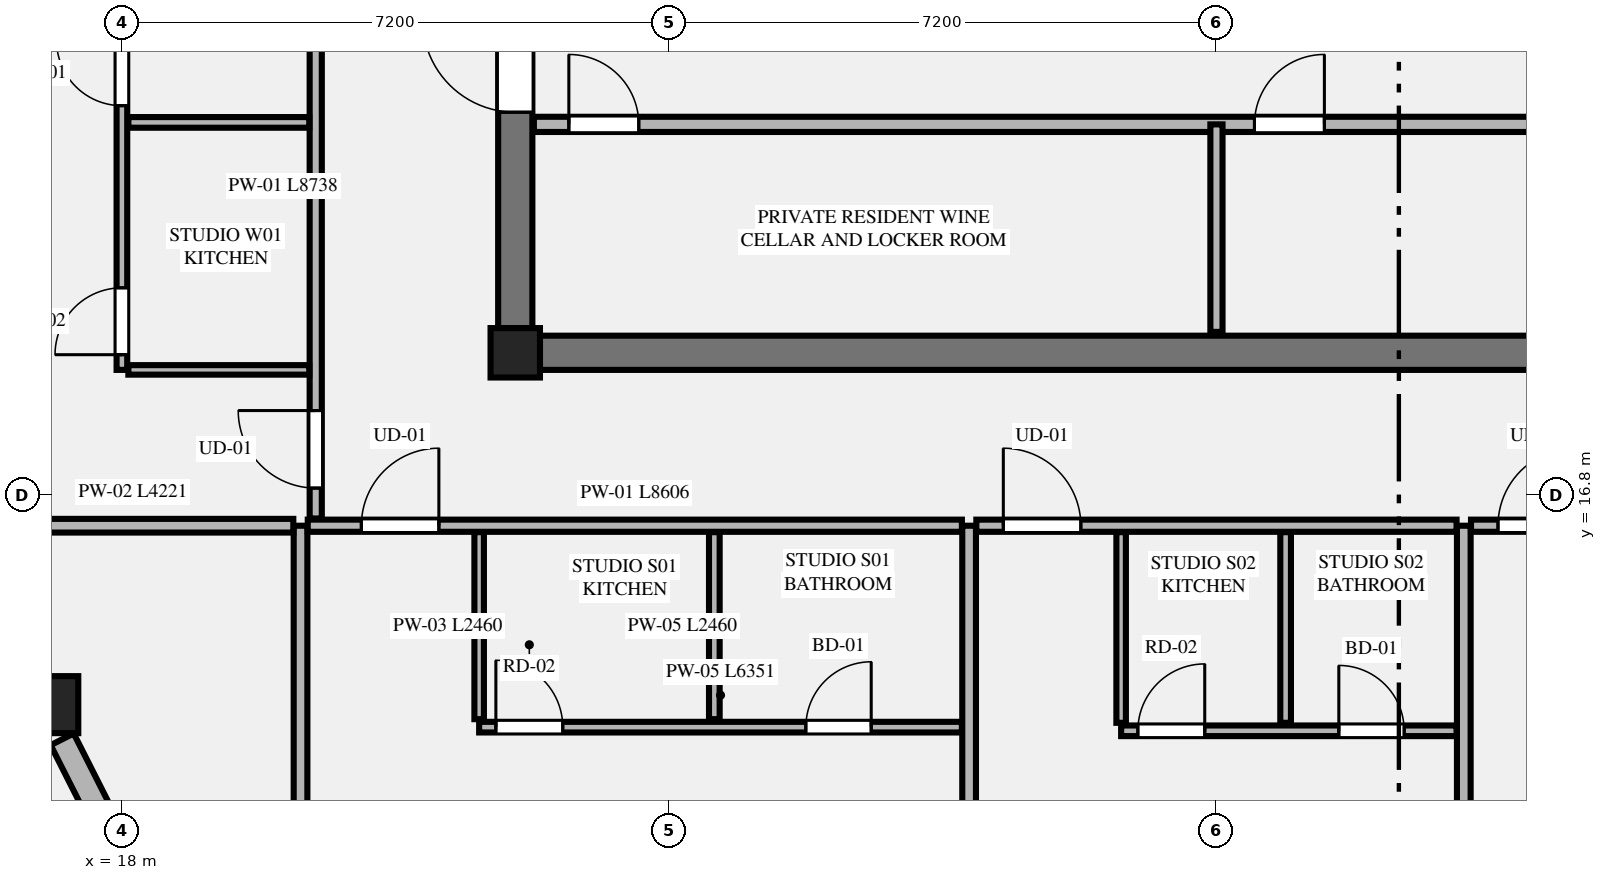
"""IFC4 building model, lengths in metres.
Left out: names, types, materials, properties, quantities, classifications, styles, units other than length and angle.
Written with IfcOpenShell. Run it as: python <this file> out.ifc"""

import sys

from ifc_helpers import new_model, si_unit, direction, frame, frame_2d, origin, origin_2d, place, context, subcontext, project, spatial, rectangle, extrude, element, fill, save


model = new_model("IFC4")
c1 = context("Model", 3, precision=1e-05, world=origin(), true_north=direction((0.0, 1.0)))
c2 = subcontext(c1, "Body", "Model", "MODEL_VIEW")
j1 = project(units=[si_unit("LENGTHUNIT", "METRE"), si_unit("PLANEANGLEUNIT", "RADIAN")], contexts=[c1])
p1 = place(None, origin())
s1 = spatial("IfcSite", under=j1, at=p1, CompositionType="ELEMENT")
p2 = place(p1, origin())
s2 = spatial("IfcBuilding", under=s1, at=p2, CompositionType="ELEMENT")
p3 = place(p2, frame((0.0, 0.0, 227.0)))
s3 = spatial("IfcBuildingStorey", under=s2, at=p3, CompositionType="ELEMENT", Elevation=227.0)
p4 = place(p3, frame((23.175, 18.675, 0.0), z_axis=(0.0, 0.0, 1.0), x_axis=(1.0, 0.0, 0.0)))
e1 = element("IfcColumn", 1, at=p4, inside=s3, PredefinedType="COLUMN", context=c2, shape_type="SweptSolid", body=[
    extrude(rectangle(XDim=0.65, YDim=0.65, at=origin_2d()), origin(), (0.0, 0.0, 1.0), 3.65),
])
p5 = place(p3, frame((23.5, 18.675, 0.0), z_axis=(0.0, 0.0, 1.0), x_axis=(1.0, 0.0, 0.0)))
e2 = element("IfcWall", 2, at=p5, inside=s3, PredefinedType="SHEAR", context=c2, shape_type="SweptSolid", body=[
    extrude(rectangle(XDim=17.8, YDim=0.45, at=frame_2d((8.9, 0.0))), origin(), (0.0, 0.0, 1.0), 3.45),
])
p6 = place(p3, frame((23.175, 19.0, 0.0), z_axis=(0.0, 0.0, 1.0), x_axis=(0.0, 1.0, 0.0)))
e3 = element("IfcWall", 3, at=p6, inside=s3, PredefinedType="SHEAR", context=c2, shape_type="SweptSolid", body=[
    extrude(rectangle(XDim=13.8, YDim=0.45, at=frame_2d((6.9, 0.0))), origin(), (0.0, 0.0, 1.0), 3.45),
])
p7 = place(p6, frame((2.84, 0.0, 0.0)))
e4 = element("IfcOpeningElement", 4, at=p7, cuts=e3, PredefinedType="OPENING", context=c2, shape_type="SweptSolid", body=[
    extrude(rectangle(XDim=1.22, YDim=2.25, at=frame_2d((0.61, 1.125))), frame((0.0, 0.235, 0.0), z_axis=(0.0, -1.0, 0.0), x_axis=(1.0, 0.0, 0.0)), (0.0, 0.0, 1.0), 0.47),
])
p8 = place(p3, frame((17.051, 14.046, 0.0), z_axis=(0.0, 0.0, 1.0), x_axis=(1.0, 0.0, 0.0)))
e5 = element("IfcColumn", 5, at=p8, inside=s3, PredefinedType="COLUMN", context=c2, shape_type="SweptSolid", body=[
    extrude(rectangle(XDim=0.75, YDim=0.75, at=origin_2d()), origin(), (0.0, 0.0, 1.0), 3.65),
])
p9 = place(p3, frame((23.42, 21.68, 0.0), z_axis=(0.0, 0.0, 1.0), x_axis=(1.0, 0.0, 0.0)))
e6 = element("IfcWall", 6, at=p9, inside=s3, PredefinedType="PLUMBINGWALL", context=c2, shape_type="SweptSolid", body=[
    extrude(rectangle(XDim=17.96, YDim=0.2, at=frame_2d((8.98, 0.0))), origin(), (0.0, 0.0, 1.0), 3.45),
])
p10 = place(p9, frame((0.46, 0.0, 0.0)))
e7 = element("IfcOpeningElement", 7, at=p10, cuts=e6, PredefinedType="OPENING", context=c2, shape_type="SweptSolid", body=[
    extrude(rectangle(XDim=0.92, YDim=2.15, at=frame_2d((0.46, 1.075))), frame((0.0, 0.11, 0.0), z_axis=(0.0, -1.0, 0.0), x_axis=(1.0, 0.0, 0.0)), (0.0, 0.0, 1.0), 0.22),
])
p11 = place(p9, frame((9.48, 0.0, 0.0)))
e8 = element("IfcOpeningElement", 8, at=p11, cuts=e6, PredefinedType="OPENING", context=c2, shape_type="SweptSolid", body=[
    extrude(rectangle(XDim=0.92, YDim=2.15, at=frame_2d((0.46, 1.075))), frame((0.0, 0.11, 0.0), z_axis=(0.0, -1.0, 0.0), x_axis=(1.0, 0.0, 0.0)), (0.0, 0.0, 1.0), 0.22),
])
p12 = place(p3, frame((32.4, 18.95, 0.0), z_axis=(0.0, 0.0, 1.0), x_axis=(0.0, 1.0, 0.0)))
e9 = element("IfcWall", 9, at=p12, inside=s3, PredefinedType="PARTITIONING", context=c2, shape_type="SweptSolid", body=[
    extrude(rectangle(XDim=2.73, YDim=0.16, at=frame_2d((1.365, 0.0))), origin(), (0.0, 0.0, 1.0), 3.45),
])
p13 = place(p3, frame((17.214, 13.59, 0.0), z_axis=(0.0, 0.0, 1.0), x_axis=(0.451440846853, -0.892301048858, 0.0)))
e10 = element("IfcWall", 10, at=p13, inside=s3, PredefinedType="STANDARD", context=c2, shape_type="SweptSolid", body=[
    extrude(rectangle(XDim=4.43, YDim=0.34, at=frame_2d((2.215, 0.0))), origin(), (0.0, 0.0, 1.0), 2.983),
])
p14 = place(p13, frame((1.44, 0.0, 0.75)))
e11 = element("IfcOpeningElement", 11, at=p14, cuts=e10, PredefinedType="OPENING", context=c2, shape_type="SweptSolid", body=[
    extrude(rectangle(XDim=1.55, YDim=2.05, at=frame_2d((0.775, 1.025))), frame((0.0, 0.18, 0.0), z_axis=(0.0, -1.0, 0.0), x_axis=(1.0, 0.0, 0.0)), (0.0, 0.0, 1.0), 0.36),
])
p15 = place(p3, frame((20.35, 8.119, 0.0), z_axis=(0.0, 0.0, 1.0), x_axis=(0.0, 1.0, 0.0)))
e12 = element("IfcWall", 12, at=p15, inside=s3, PredefinedType="PARTITIONING", context=c2, shape_type="SweptSolid", body=[
    extrude(rectangle(XDim=8.281, YDim=0.18, at=frame_2d((4.141, 0.0))), origin(), (0.0, 0.0, 1.0), 3.45),
])
for number, where, z_axis, x_axis in (
    (13, (29.146, 7.405, 0.0), (0.0, 0.0, 1.0), (0.0, 1.0, 0.0)),
    (14, (35.654, 7.405, 0.0), (0.0, 0.0, 1.0), (0.0, 1.0, 0.0)),
):
    element("IfcWall", number, at=place(p3, frame(where, z_axis=z_axis, x_axis=x_axis)), inside=s3, PredefinedType="PARTITIONING", context=c2, shape_type="SweptSolid", body=[
        extrude(rectangle(XDim=8.995, YDim=0.18, at=frame_2d((4.498, 0.0))), origin(), (0.0, 0.0, 1.0), 2.907),
    ])
p16 = place(p3, frame((20.445, 16.4, 0.0), z_axis=(0.0, 0.0, 1.0), x_axis=(1.0, 0.0, 0.0)))
e15 = element("IfcWall", 15, at=p16, inside=s3, PredefinedType="PARTITIONING", context=c2, shape_type="SweptSolid", body=[
    extrude(rectangle(XDim=8.606, YDim=0.16, at=frame_2d((4.303, 0.0))), origin(), (0.0, 0.0, 1.0), 3.45),
])
p17 = place(p16, frame((0.705, 0.0, 0.0)))
e16 = element("IfcOpeningElement", 16, at=p17, cuts=e15, PredefinedType="OPENING", context=c2, shape_type="SweptSolid", body=[
    extrude(rectangle(XDim=1.02, YDim=2.25, at=frame_2d((0.51, 1.125))), frame((0.0, 0.09, 0.0), z_axis=(0.0, -1.0, 0.0), x_axis=(1.0, 0.0, 0.0)), (0.0, 0.0, 1.0), 0.18),
])
p18 = place(p3, frame((22.7, 13.855, 0.0), z_axis=(0.0, 0.0, 1.0), x_axis=(0.0, 1.0, 0.0)))
e17 = element("IfcWall", 17, at=p18, inside=s3, PredefinedType="PARTITIONING", context=c2, shape_type="SweptSolid", body=[
    extrude(rectangle(XDim=2.46, YDim=0.125, at=frame_2d((1.23, 0.0))), origin(), (0.0, 0.0, 1.0), 2.907),
])
p19 = place(p3, frame((22.7, 13.75, 0.0), z_axis=(0.0, 0.0, 1.0), x_axis=(1.0, 0.0, 0.0)))
e18 = element("IfcWall", 18, at=p19, inside=s3, PredefinedType="PLUMBINGWALL", context=c2, shape_type="SweptSolid", body=[
    extrude(rectangle(XDim=6.351, YDim=0.14, at=frame_2d((3.176, 0.0))), origin(), (0.0, 0.0, 1.0), 3.45),
])
p20 = place(p19, frame((4.298, 0.0, 0.0)))
e19 = element("IfcOpeningElement", 19, at=p20, cuts=e18, PredefinedType="OPENING", context=c2, shape_type="SweptSolid", body=[
    extrude(rectangle(XDim=0.86, YDim=2.1, at=frame_2d((0.43, 1.05))), frame((0.0, 0.08, 0.0), z_axis=(0.0, -1.0, 0.0), x_axis=(1.0, 0.0, 0.0)), (0.0, 0.0, 1.0), 0.16),
])
p21 = place(p19, frame((0.22, 0.0, 0.0)))
e20 = element("IfcOpeningElement", 20, at=p21, cuts=e18, PredefinedType="OPENING", context=c2, shape_type="SweptSolid", body=[
    extrude(rectangle(XDim=0.88, YDim=2.15, at=frame_2d((0.44, 1.075))), frame((0.0, 0.08, 0.0), z_axis=(0.0, -1.0, 0.0), x_axis=(1.0, 0.0, 0.0)), (0.0, 0.0, 1.0), 0.16),
])
p22 = place(p3, frame((25.794, 13.855, 0.0), z_axis=(0.0, 0.0, 1.0), x_axis=(0.0, 1.0, 0.0)))
e21 = element("IfcWall", 21, at=p22, inside=s3, PredefinedType="PLUMBINGWALL", context=c2, shape_type="SweptSolid", body=[
    extrude(rectangle(XDim=2.46, YDim=0.14, at=frame_2d((1.23, 0.0))), origin(), (0.0, 0.0, 1.0), 3.45),
])
p23 = place(p3, frame((29.241, 16.4, 0.0), z_axis=(0.0, 0.0, 1.0), x_axis=(1.0, 0.0, 0.0)))
e22 = element("IfcWall", 22, at=p23, inside=s3, PredefinedType="PARTITIONING", context=c2, shape_type="SweptSolid", body=[
    extrude(rectangle(XDim=6.318, YDim=0.16, at=frame_2d((3.159, 0.0))), origin(), (0.0, 0.0, 1.0), 3.45),
])
p24 = place(p23, frame((0.355, 0.0, 0.0)))
e23 = element("IfcOpeningElement", 23, at=p24, cuts=e22, PredefinedType="OPENING", context=c2, shape_type="SweptSolid", body=[
    extrude(rectangle(XDim=1.02, YDim=2.25, at=frame_2d((0.51, 1.125))), frame((0.0, 0.09, 0.0), z_axis=(0.0, -1.0, 0.0), x_axis=(1.0, 0.0, 0.0)), (0.0, 0.0, 1.0), 0.18),
])
p25 = place(p3, frame((31.146, 13.807, 0.0), z_axis=(0.0, 0.0, 1.0), x_axis=(0.0, 1.0, 0.0)))
e24 = element("IfcWall", 24, at=p25, inside=s3, PredefinedType="PARTITIONING", context=c2, shape_type="SweptSolid", body=[
    extrude(rectangle(XDim=2.508, YDim=0.125, at=frame_2d((1.254, 0.0))), origin(), (0.0, 0.0, 1.0), 3.45),
])
p26 = place(p3, frame((31.146, 13.702, 0.0), z_axis=(0.0, 0.0, 1.0), x_axis=(1.0, 0.0, 0.0)))
e25 = element("IfcWall", 25, at=p26, inside=s3, PredefinedType="PLUMBINGWALL", context=c2, shape_type="SweptSolid", body=[
    extrude(rectangle(XDim=4.413, YDim=0.14, at=frame_2d((2.207, 0.0))), origin(), (0.0, 0.0, 1.0), 3.45),
])
p27 = place(p26, frame((2.864, 0.0, 0.0)))
e26 = element("IfcOpeningElement", 26, at=p27, cuts=e25, PredefinedType="OPENING", context=c2, shape_type="SweptSolid", body=[
    extrude(rectangle(XDim=0.86, YDim=2.1, at=frame_2d((0.43, 1.05))), frame((0.0, 0.08, 0.0), z_axis=(0.0, -1.0, 0.0), x_axis=(1.0, 0.0, 0.0)), (0.0, 0.0, 1.0), 0.16),
])
p28 = place(p26, frame((0.22, 0.0, 0.0)))
e27 = element("IfcOpeningElement", 27, at=p28, cuts=e25, PredefinedType="OPENING", context=c2, shape_type="SweptSolid", body=[
    extrude(rectangle(XDim=0.88, YDim=2.15, at=frame_2d((0.44, 1.075))), frame((0.0, 0.08, 0.0), z_axis=(0.0, -1.0, 0.0), x_axis=(1.0, 0.0, 0.0)), (0.0, 0.0, 1.0), 0.16),
])
p29 = place(p3, frame((33.31, 13.807, 0.0), z_axis=(0.0, 0.0, 1.0), x_axis=(0.0, 1.0, 0.0)))
e28 = element("IfcWall", 28, at=p29, inside=s3, PredefinedType="PLUMBINGWALL", context=c2, shape_type="SweptSolid", body=[
    extrude(rectangle(XDim=2.508, YDim=0.14, at=frame_2d((1.254, 0.0))), origin(), (0.0, 0.0, 1.0), 3.45),
])
p30 = place(p3, frame((35.749, 16.4, 0.0), z_axis=(0.0, 0.0, 1.0), x_axis=(1.0, 0.0, 0.0)))
e29 = element("IfcWall", 29, at=p30, inside=s3, PredefinedType="PARTITIONING", context=c2, shape_type="SweptSolid", body=[
    extrude(rectangle(XDim=8.606, YDim=0.16, at=frame_2d((4.303, 0.0))), origin(), (0.0, 0.0, 1.0), 3.45),
])
p31 = place(p30, frame((0.355, 0.0, 0.0)))
e30 = element("IfcOpeningElement", 30, at=p31, cuts=e29, PredefinedType="OPENING", context=c2, shape_type="SweptSolid", body=[
    extrude(rectangle(XDim=1.02, YDim=2.25, at=frame_2d((0.51, 1.125))), frame((0.0, 0.09, 0.0), z_axis=(0.0, -1.0, 0.0), x_axis=(1.0, 0.0, 0.0)), (0.0, 0.0, 1.0), 0.18),
])
p32 = place(p3, frame((16.034, 16.4, 0.0), z_axis=(0.0, 0.0, 1.0), x_axis=(1.0, 0.0, 0.0)))
e31 = element("IfcWall", 31, at=p32, inside=s3, PredefinedType="PARTITIONING", context=c2, shape_type="SweptSolid", body=[
    extrude(rectangle(XDim=4.221, YDim=0.18, at=frame_2d((2.11, 0.0))), origin(), (0.0, 0.0, 1.0), 3.45),
])
p33 = place(p3, frame((20.55, 16.495, 0.0), z_axis=(0.0, 0.0, 1.0), x_axis=(0.0, 1.0, 0.0)))
e32 = element("IfcWall", 32, at=p33, inside=s3, PredefinedType="PARTITIONING", context=c2, shape_type="SweptSolid", body=[
    extrude(rectangle(XDim=8.738, YDim=0.16, at=frame_2d((4.369, 0.0))), origin(), (0.0, 0.0, 1.0), 3.137),
])
p34 = place(p33, frame((0.4, 0.0, 0.0)))
e33 = element("IfcOpeningElement", 33, at=p34, cuts=e32, PredefinedType="OPENING", context=c2, shape_type="SweptSolid", body=[
    extrude(rectangle(XDim=1.02, YDim=2.25, at=frame_2d((0.51, 1.125))), frame((0.0, 0.09, 0.0), z_axis=(0.0, -1.0, 0.0), x_axis=(1.0, 0.0, 0.0)), (0.0, 0.0, 1.0), 0.18),
])
p35 = place(p3, frame((18.085, 18.45, 0.0), z_axis=(0.0, 0.0, 1.0), x_axis=(1.0, 0.0, 0.0)))
e34 = element("IfcWall", 34, at=p35, inside=s3, PredefinedType="PARTITIONING", context=c2, shape_type="SweptSolid", body=[
    extrude(rectangle(XDim=2.38, YDim=0.125, at=frame_2d((1.19, 0.0))), origin(), (0.0, 0.0, 1.0), 3.45),
])
p36 = place(p3, frame((18.0, 18.45, 0.0), z_axis=(0.0, 0.0, 1.0), x_axis=(0.0, 1.0, 0.0)))
e35 = element("IfcWall", 35, at=p36, inside=s3, PredefinedType="PLUMBINGWALL", context=c2, shape_type="SweptSolid", body=[
    extrude(rectangle(XDim=6.783, YDim=0.14, at=frame_2d((3.392, 0.0))), origin(), (0.0, 0.0, 1.0), 3.45),
])
p37 = place(p36, frame((3.476, 0.0, 0.0)))
e36 = element("IfcOpeningElement", 36, at=p37, cuts=e35, PredefinedType="OPENING", context=c2, shape_type="SweptSolid", body=[
    extrude(rectangle(XDim=0.86, YDim=2.1, at=frame_2d((0.43, 1.05))), frame((0.0, 0.08, 0.0), z_axis=(0.0, -1.0, 0.0), x_axis=(1.0, 0.0, 0.0)), (0.0, 0.0, 1.0), 0.16),
])
p38 = place(p36, frame((0.2, 0.0, 0.0)))
e37 = element("IfcOpeningElement", 37, at=p38, cuts=e35, PredefinedType="OPENING", context=c2, shape_type="SweptSolid", body=[
    extrude(rectangle(XDim=0.88, YDim=2.15, at=frame_2d((0.44, 1.075))), frame((0.0, 0.08, 0.0), z_axis=(0.0, -1.0, 0.0), x_axis=(1.0, 0.0, 0.0)), (0.0, 0.0, 1.0), 0.16),
])
p39 = place(p3, frame((18.085, 21.706, 0.0), z_axis=(0.0, 0.0, 1.0), x_axis=(1.0, 0.0, 0.0)))
e38 = element("IfcWall", 38, at=p39, inside=s3, PredefinedType="PLUMBINGWALL", context=c2, shape_type="SweptSolid", body=[
    extrude(rectangle(XDim=2.38, YDim=0.14, at=frame_2d((1.19, 0.0))), origin(), (0.0, 0.0, 1.0), 3.45),
])
p40 = place(p7, origin())
e39 = element("IfcDoor", 39, at=p40, inside=s3, OperationType="SINGLE_SWING_RIGHT", PredefinedType="DOOR", context=c2, shape_type="SweptSolid", body=[
    extrude(rectangle(XDim=1.22, YDim=2.25, at=frame_2d((0.61, 1.125))), frame((0.0, 0.025, 0.0), z_axis=(0.0, -1.0, 0.0), x_axis=(1.0, 0.0, 0.0)), (0.0, 0.0, 1.0), 0.05),
])
fill(e4, e39)
p41 = place(p10, origin())
e40 = element("IfcDoor", 40, at=p41, inside=s3, OperationType="SINGLE_SWING_LEFT", PredefinedType="DOOR", context=c2, shape_type="SweptSolid", body=[
    extrude(rectangle(XDim=0.92, YDim=2.15, at=frame_2d((0.46, 1.075))), frame((0.0, 0.025, 0.0), z_axis=(0.0, -1.0, 0.0), x_axis=(1.0, 0.0, 0.0)), (0.0, 0.0, 1.0), 0.05),
])
fill(e7, e40)
p42 = place(p11, origin())
e41 = element("IfcDoor", 41, at=p42, inside=s3, OperationType="SINGLE_SWING_RIGHT", PredefinedType="DOOR", context=c2, shape_type="SweptSolid", body=[
    extrude(rectangle(XDim=0.92, YDim=2.15, at=frame_2d((0.46, 1.075))), frame((0.0, 0.025, 0.0), z_axis=(0.0, -1.0, 0.0), x_axis=(1.0, 0.0, 0.0)), (0.0, 0.0, 1.0), 0.05),
])
fill(e8, e41)
p43 = place(p20, origin())
e42 = element("IfcDoor", 42, at=p43, inside=s3, OperationType="SINGLE_SWING_RIGHT", PredefinedType="DOOR", context=c2, shape_type="SweptSolid", body=[
    extrude(rectangle(XDim=0.86, YDim=2.1, at=frame_2d((0.43, 1.05))), frame((0.0, 0.025, 0.0), z_axis=(0.0, -1.0, 0.0), x_axis=(1.0, 0.0, 0.0)), (0.0, 0.0, 1.0), 0.05),
])
fill(e19, e42)
p44 = place(p17, origin())
e43 = element("IfcDoor", 43, at=p44, inside=s3, OperationType="SINGLE_SWING_RIGHT", PredefinedType="DOOR", context=c2, shape_type="SweptSolid", body=[
    extrude(rectangle(XDim=1.02, YDim=2.25, at=frame_2d((0.51, 1.125))), frame((0.0, 0.025, 0.0), z_axis=(0.0, -1.0, 0.0), x_axis=(1.0, 0.0, 0.0)), (0.0, 0.0, 1.0), 0.05),
])
fill(e16, e43)
p45 = place(p21, origin())
e44 = element("IfcDoor", 44, at=p45, inside=s3, OperationType="SINGLE_SWING_LEFT", PredefinedType="DOOR", context=c2, shape_type="SweptSolid", body=[
    extrude(rectangle(XDim=0.88, YDim=2.15, at=frame_2d((0.44, 1.075))), frame((0.0, 0.025, 0.0), z_axis=(0.0, -1.0, 0.0), x_axis=(1.0, 0.0, 0.0)), (0.0, 0.0, 1.0), 0.05),
])
fill(e20, e44)
p46 = place(p27, origin())
e45 = element("IfcDoor", 45, at=p46, inside=s3, OperationType="SINGLE_SWING_LEFT", PredefinedType="DOOR", context=c2, shape_type="SweptSolid", body=[
    extrude(rectangle(XDim=0.86, YDim=2.1, at=frame_2d((0.43, 1.05))), frame((0.0, 0.025, 0.0), z_axis=(0.0, -1.0, 0.0), x_axis=(1.0, 0.0, 0.0)), (0.0, 0.0, 1.0), 0.05),
])
fill(e26, e45)
p47 = place(p24, origin())
e46 = element("IfcDoor", 46, at=p47, inside=s3, OperationType="SINGLE_SWING_LEFT", PredefinedType="DOOR", context=c2, shape_type="SweptSolid", body=[
    extrude(rectangle(XDim=1.02, YDim=2.25, at=frame_2d((0.51, 1.125))), frame((0.0, 0.025, 0.0), z_axis=(0.0, -1.0, 0.0), x_axis=(1.0, 0.0, 0.0)), (0.0, 0.0, 1.0), 0.05),
])
fill(e23, e46)
p48 = place(p28, origin())
e47 = element("IfcDoor", 47, at=p48, inside=s3, OperationType="SINGLE_SWING_RIGHT", PredefinedType="DOOR", context=c2, shape_type="SweptSolid", body=[
    extrude(rectangle(XDim=0.88, YDim=2.15, at=frame_2d((0.44, 1.075))), frame((0.0, 0.025, 0.0), z_axis=(0.0, -1.0, 0.0), x_axis=(1.0, 0.0, 0.0)), (0.0, 0.0, 1.0), 0.05),
])
fill(e27, e47)
p49 = place(p31, origin())
e48 = element("IfcDoor", 48, at=p49, inside=s3, OperationType="SINGLE_SWING_RIGHT", PredefinedType="DOOR", context=c2, shape_type="SweptSolid", body=[
    extrude(rectangle(XDim=1.02, YDim=2.25, at=frame_2d((0.51, 1.125))), frame((0.0, 0.025, 0.0), z_axis=(0.0, -1.0, 0.0), x_axis=(1.0, 0.0, 0.0)), (0.0, 0.0, 1.0), 0.05),
])
fill(e30, e48)
p50 = place(p37, origin())
e49 = element("IfcDoor", 49, at=p50, inside=s3, OperationType="SINGLE_SWING_RIGHT", PredefinedType="DOOR", context=c2, shape_type="SweptSolid", body=[
    extrude(rectangle(XDim=0.86, YDim=2.1, at=frame_2d((0.43, 1.05))), frame((0.0, 0.025, 0.0), z_axis=(0.0, -1.0, 0.0), x_axis=(1.0, 0.0, 0.0)), (0.0, 0.0, 1.0), 0.05),
])
fill(e36, e49)
p51 = place(p34, origin())
e50 = element("IfcDoor", 50, at=p51, inside=s3, OperationType="SINGLE_SWING_RIGHT", PredefinedType="DOOR", context=c2, shape_type="SweptSolid", body=[
    extrude(rectangle(XDim=1.02, YDim=2.25, at=frame_2d((0.51, 1.125))), frame((0.0, 0.025, 0.0), z_axis=(0.0, -1.0, 0.0), x_axis=(1.0, 0.0, 0.0)), (0.0, 0.0, 1.0), 0.05),
])
fill(e33, e50)
p52 = place(p38, origin())
e51 = element("IfcDoor", 51, at=p52, inside=s3, OperationType="SINGLE_SWING_LEFT", PredefinedType="DOOR", context=c2, shape_type="SweptSolid", body=[
    extrude(rectangle(XDim=0.88, YDim=2.15, at=frame_2d((0.44, 1.075))), frame((0.0, 0.025, 0.0), z_axis=(0.0, -1.0, 0.0), x_axis=(1.0, 0.0, 0.0)), (0.0, 0.0, 1.0), 0.05),
])
fill(e37, e51)
save(model, sys.argv[1])
